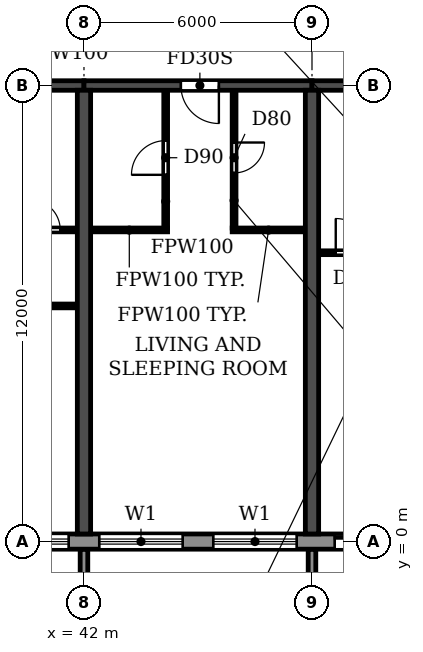
"""IFC4 building model, lengths in metres.
Left out: names, types, materials, properties, quantities, classifications, styles, units other than length and angle.
Written with IfcOpenShell. Run it as: python <this file> out.ifc"""

import sys

from ifc_helpers import new_model, si_unit, direction, frame, frame_2d, origin, place, context, subcontext, project, spatial, polyline, rectangle, outline, extrude, source, transform, mapped, element, fill, save


model = new_model("IFC4")
c1 = context("Model", 3, precision=1e-05, world=origin(), true_north=direction((0.0, 1.0)))
c2 = subcontext(c1, "Body", "Model", "MODEL_VIEW")
j1 = project(units=[si_unit("LENGTHUNIT", "METRE"), si_unit("PLANEANGLEUNIT", "RADIAN")], contexts=[c1])
p1 = place(None, origin())
s1 = spatial("IfcSite", under=j1, at=p1, CompositionType="ELEMENT")
p2 = place(p1, origin())
s2 = spatial("IfcBuilding", under=s1, at=p2, CompositionType="ELEMENT")
p3 = place(p2, frame((0.0, 0.0, 76.2)))
s3 = spatial("IfcBuildingStorey", under=s2, at=p3, CompositionType="ELEMENT", Elevation=76.2)
for number, where, z_axis, x_axis in (
    (1, (42.0, 0.2, 0.0), (0.0, 0.0, 1.0), (0.0, 1.0, 0.0)),
    (2, (48.0, 0.2, 0.0), (0.0, 0.0, 1.0), (0.0, 1.0, 0.0)),
):
    element("IfcWall", number, at=place(p3, frame(where, z_axis=z_axis, x_axis=x_axis)), inside=s3, PredefinedType="SHEAR", context=c2, shape_type="SweptSolid", body=[
        extrude(rectangle(XDim=11.675, YDim=0.35, at=frame_2d((5.837, 0.0))), origin(), (0.0, 0.0, 1.0), 3.06),
    ])
p4 = place(p3, frame((36.0, 12.0, 0.0), z_axis=(0.0, 0.0, 1.0), x_axis=(1.0, 0.0, 0.0)))
e3 = element("IfcWall", 3, at=p4, inside=s3, PredefinedType="SHEAR", context=c2, shape_type="SweptSolid", body=[
    extrude(rectangle(XDim=6.0, YDim=0.25, at=frame_2d((3.0, 0.0))), origin(), (0.0, 0.0, 1.0), 2.46),
])
p5 = place(p4, frame((2.55, 0.0, 0.0)))
e4 = element("IfcOpeningElement", 4, at=p5, cuts=e3, PredefinedType="OPENING", context=c2, shape_type="SweptSolid", body=[
    extrude(rectangle(XDim=1.0, YDim=2.1, at=frame_2d((0.5, 1.05))), frame((0.0, 0.135, 0.0), z_axis=(0.0, -1.0, 0.0), x_axis=(1.0, 0.0, 0.0)), (0.0, 0.0, 1.0), 0.27),
])
p6 = place(p3, frame((42.0, 12.0, 0.0), z_axis=(0.0, 0.0, 1.0), x_axis=(1.0, 0.0, 0.0)))
e5 = element("IfcWall", 5, at=p6, inside=s3, PredefinedType="SHEAR", context=c2, shape_type="SweptSolid", body=[
    extrude(rectangle(XDim=6.0, YDim=0.25, at=frame_2d((3.0, 0.0))), origin(), (0.0, 0.0, 1.0), 2.46),
])
p7 = place(p6, frame((2.55, 0.0, 0.0)))
e6 = element("IfcOpeningElement", 6, at=p7, cuts=e5, PredefinedType="OPENING", context=c2, shape_type="SweptSolid", body=[
    extrude(rectangle(XDim=1.0, YDim=2.1, at=frame_2d((0.5, 1.05))), frame((0.0, 0.135, 0.0), z_axis=(0.0, -1.0, 0.0), x_axis=(1.0, 0.0, 0.0)), (0.0, 0.0, 1.0), 0.27),
])
p8 = place(p3, frame((48.0, 12.0, 0.0), z_axis=(0.0, 0.0, 1.0), x_axis=(1.0, 0.0, 0.0)))
e7 = element("IfcWall", 7, at=p8, inside=s3, PredefinedType="SHEAR", context=c2, shape_type="SweptSolid", body=[
    extrude(rectangle(XDim=6.0, YDim=0.25, at=frame_2d((3.0, 0.0))), origin(), (0.0, 0.0, 1.0), 2.46),
])
p9 = place(p8, frame((2.55, 0.0, 0.0)))
e8 = element("IfcOpeningElement", 8, at=p9, cuts=e7, PredefinedType="OPENING", context=c2, shape_type="SweptSolid", body=[
    extrude(rectangle(XDim=1.0, YDim=2.1, at=frame_2d((0.5, 1.05))), frame((0.0, 0.135, 0.0), z_axis=(0.0, -1.0, 0.0), x_axis=(1.0, 0.0, 0.0)), (0.0, 0.0, 1.0), 0.27),
])
p10 = place(p3, frame((10.683, 0.0, 0.0), z_axis=(0.0, 0.0, 1.0), x_axis=(1.0, 0.0, 0.0)))
e9 = element("IfcWall", 9, at=p10, inside=s3, PredefinedType="STANDARD", context=c2, shape_type="SweptSolid", body=[
    extrude(rectangle(XDim=80.634, YDim=0.4, at=frame_2d((40.317, 0.0))), origin(), (0.0, 0.0, 1.0), 3.06),
])
p11 = place(p10, frame((1.717, 0.0, 0.9)))
e10 = element("IfcOpeningElement", 10, at=p11, cuts=e9, PredefinedType="OPENING", context=c2, shape_type="SweptSolid", body=[
    extrude(rectangle(XDim=2.2, YDim=1.5, at=frame_2d((1.1, 0.75))), frame((0.0, 0.21, 0.0), z_axis=(0.0, -1.0, 0.0), x_axis=(1.0, 0.0, 0.0)), (0.0, 0.0, 1.0), 0.42),
])
p12 = place(p10, frame((4.917, 0.0, 0.0)))
e11 = element("IfcOpeningElement", 11, at=p12, cuts=e9, PredefinedType="OPENING", context=c2, shape_type="SweptSolid", body=[
    extrude(rectangle(XDim=1.8, YDim=2.4, at=frame_2d((0.9, 1.2))), frame((0.0, 0.21, 0.0), z_axis=(0.0, -1.0, 0.0), x_axis=(1.0, 0.0, 0.0)), (0.0, 0.0, 1.0), 0.42),
])
p13 = place(p10, frame((7.717, 0.0, 0.9)))
e12 = element("IfcOpeningElement", 12, at=p13, cuts=e9, PredefinedType="OPENING", context=c2, shape_type="SweptSolid", body=[
    extrude(rectangle(XDim=2.2, YDim=1.5, at=frame_2d((1.1, 0.75))), frame((0.0, 0.21, 0.0), z_axis=(0.0, -1.0, 0.0), x_axis=(1.0, 0.0, 0.0)), (0.0, 0.0, 1.0), 0.42),
])
p14 = place(p10, frame((10.717, 0.0, 0.9)))
e13 = element("IfcOpeningElement", 13, at=p14, cuts=e9, PredefinedType="OPENING", context=c2, shape_type="SweptSolid", body=[
    extrude(rectangle(XDim=2.2, YDim=1.5, at=frame_2d((1.1, 0.75))), frame((0.0, 0.21, 0.0), z_axis=(0.0, -1.0, 0.0), x_axis=(1.0, 0.0, 0.0)), (0.0, 0.0, 1.0), 0.42),
])
p15 = place(p10, frame((13.717, 0.0, 0.9)))
e14 = element("IfcOpeningElement", 14, at=p15, cuts=e9, PredefinedType="OPENING", context=c2, shape_type="SweptSolid", body=[
    extrude(rectangle(XDim=2.2, YDim=1.5, at=frame_2d((1.1, 0.75))), frame((0.0, 0.21, 0.0), z_axis=(0.0, -1.0, 0.0), x_axis=(1.0, 0.0, 0.0)), (0.0, 0.0, 1.0), 0.42),
])
p16 = place(p10, frame((16.917, 0.0, 0.0)))
e15 = element("IfcOpeningElement", 15, at=p16, cuts=e9, PredefinedType="OPENING", context=c2, shape_type="SweptSolid", body=[
    extrude(rectangle(XDim=1.8, YDim=2.4, at=frame_2d((0.9, 1.2))), frame((0.0, 0.21, 0.0), z_axis=(0.0, -1.0, 0.0), x_axis=(1.0, 0.0, 0.0)), (0.0, 0.0, 1.0), 0.42),
])
p17 = place(p10, frame((19.717, 0.0, 0.9)))
e16 = element("IfcOpeningElement", 16, at=p17, cuts=e9, PredefinedType="OPENING", context=c2, shape_type="SweptSolid", body=[
    extrude(rectangle(XDim=2.2, YDim=1.5, at=frame_2d((1.1, 0.75))), frame((0.0, 0.21, 0.0), z_axis=(0.0, -1.0, 0.0), x_axis=(1.0, 0.0, 0.0)), (0.0, 0.0, 1.0), 0.42),
])
p18 = place(p10, frame((22.717, 0.0, 0.9)))
e17 = element("IfcOpeningElement", 17, at=p18, cuts=e9, PredefinedType="OPENING", context=c2, shape_type="SweptSolid", body=[
    extrude(rectangle(XDim=2.2, YDim=1.5, at=frame_2d((1.1, 0.75))), frame((0.0, 0.21, 0.0), z_axis=(0.0, -1.0, 0.0), x_axis=(1.0, 0.0, 0.0)), (0.0, 0.0, 1.0), 0.42),
])
p19 = place(p10, frame((25.917, 0.0, 0.0)))
e18 = element("IfcOpeningElement", 18, at=p19, cuts=e9, PredefinedType="OPENING", context=c2, shape_type="SweptSolid", body=[
    extrude(rectangle(XDim=1.8, YDim=2.4, at=frame_2d((0.9, 1.2))), frame((0.0, 0.21, 0.0), z_axis=(0.0, -1.0, 0.0), x_axis=(1.0, 0.0, 0.0)), (0.0, 0.0, 1.0), 0.42),
])
p20 = place(p10, frame((28.717, 0.0, 0.9)))
e19 = element("IfcOpeningElement", 19, at=p20, cuts=e9, PredefinedType="OPENING", context=c2, shape_type="SweptSolid", body=[
    extrude(rectangle(XDim=2.2, YDim=1.5, at=frame_2d((1.1, 0.75))), frame((0.0, 0.21, 0.0), z_axis=(0.0, -1.0, 0.0), x_axis=(1.0, 0.0, 0.0)), (0.0, 0.0, 1.0), 0.42),
])
p21 = place(p10, frame((31.717, 0.0, 0.9)))
e20 = element("IfcOpeningElement", 20, at=p21, cuts=e9, PredefinedType="OPENING", context=c2, shape_type="SweptSolid", body=[
    extrude(rectangle(XDim=2.2, YDim=1.5, at=frame_2d((1.1, 0.75))), frame((0.0, 0.21, 0.0), z_axis=(0.0, -1.0, 0.0), x_axis=(1.0, 0.0, 0.0)), (0.0, 0.0, 1.0), 0.42),
])
p22 = place(p10, frame((34.717, 0.0, 0.9)))
e21 = element("IfcOpeningElement", 21, at=p22, cuts=e9, PredefinedType="OPENING", context=c2, shape_type="SweptSolid", body=[
    extrude(rectangle(XDim=2.2, YDim=1.5, at=frame_2d((1.1, 0.75))), frame((0.0, 0.21, 0.0), z_axis=(0.0, -1.0, 0.0), x_axis=(1.0, 0.0, 0.0)), (0.0, 0.0, 1.0), 0.42),
])
p23 = place(p10, frame((37.917, 0.0, 0.0)))
e22 = element("IfcOpeningElement", 22, at=p23, cuts=e9, PredefinedType="OPENING", context=c2, shape_type="SweptSolid", body=[
    extrude(rectangle(XDim=1.8, YDim=2.4, at=frame_2d((0.9, 1.2))), frame((0.0, 0.21, 0.0), z_axis=(0.0, -1.0, 0.0), x_axis=(1.0, 0.0, 0.0)), (0.0, 0.0, 1.0), 0.42),
])
p24 = place(p10, frame((40.717, 0.0, 0.9)))
e23 = element("IfcOpeningElement", 23, at=p24, cuts=e9, PredefinedType="OPENING", context=c2, shape_type="SweptSolid", body=[
    extrude(rectangle(XDim=2.2, YDim=1.5, at=frame_2d((1.1, 0.75))), frame((0.0, 0.21, 0.0), z_axis=(0.0, -1.0, 0.0), x_axis=(1.0, 0.0, 0.0)), (0.0, 0.0, 1.0), 0.42),
])
p25 = place(p10, frame((43.717, 0.0, 0.9)))
e24 = element("IfcOpeningElement", 24, at=p25, cuts=e9, PredefinedType="OPENING", context=c2, shape_type="SweptSolid", body=[
    extrude(rectangle(XDim=2.2, YDim=1.5, at=frame_2d((1.1, 0.75))), frame((0.0, 0.21, 0.0), z_axis=(0.0, -1.0, 0.0), x_axis=(1.0, 0.0, 0.0)), (0.0, 0.0, 1.0), 0.42),
])
p26 = place(p10, frame((46.717, 0.0, 0.9)))
e25 = element("IfcOpeningElement", 25, at=p26, cuts=e9, PredefinedType="OPENING", context=c2, shape_type="SweptSolid", body=[
    extrude(rectangle(XDim=2.2, YDim=1.5, at=frame_2d((1.1, 0.75))), frame((0.0, 0.21, 0.0), z_axis=(0.0, -1.0, 0.0), x_axis=(1.0, 0.0, 0.0)), (0.0, 0.0, 1.0), 0.42),
])
p27 = place(p10, frame((49.917, 0.0, 0.0)))
e26 = element("IfcOpeningElement", 26, at=p27, cuts=e9, PredefinedType="OPENING", context=c2, shape_type="SweptSolid", body=[
    extrude(rectangle(XDim=1.8, YDim=2.4, at=frame_2d((0.9, 1.2))), frame((0.0, 0.21, 0.0), z_axis=(0.0, -1.0, 0.0), x_axis=(1.0, 0.0, 0.0)), (0.0, 0.0, 1.0), 0.42),
])
p28 = place(p10, frame((52.717, 0.0, 0.9)))
e27 = element("IfcOpeningElement", 27, at=p28, cuts=e9, PredefinedType="OPENING", context=c2, shape_type="SweptSolid", body=[
    extrude(rectangle(XDim=2.2, YDim=1.5, at=frame_2d((1.1, 0.75))), frame((0.0, 0.21, 0.0), z_axis=(0.0, -1.0, 0.0), x_axis=(1.0, 0.0, 0.0)), (0.0, 0.0, 1.0), 0.42),
])
p29 = place(p10, frame((55.717, 0.0, 0.9)))
e28 = element("IfcOpeningElement", 28, at=p29, cuts=e9, PredefinedType="OPENING", context=c2, shape_type="SweptSolid", body=[
    extrude(rectangle(XDim=2.2, YDim=1.5, at=frame_2d((1.1, 0.75))), frame((0.0, 0.21, 0.0), z_axis=(0.0, -1.0, 0.0), x_axis=(1.0, 0.0, 0.0)), (0.0, 0.0, 1.0), 0.42),
])
p30 = place(p10, frame((58.717, 0.0, 0.9)))
e29 = element("IfcOpeningElement", 29, at=p30, cuts=e9, PredefinedType="OPENING", context=c2, shape_type="SweptSolid", body=[
    extrude(rectangle(XDim=2.2, YDim=1.5, at=frame_2d((1.1, 0.75))), frame((0.0, 0.21, 0.0), z_axis=(0.0, -1.0, 0.0), x_axis=(1.0, 0.0, 0.0)), (0.0, 0.0, 1.0), 0.42),
])
p31 = place(p10, frame((61.717, 0.0, 0.9)))
e30 = element("IfcOpeningElement", 30, at=p31, cuts=e9, PredefinedType="OPENING", context=c2, shape_type="SweptSolid", body=[
    extrude(rectangle(XDim=2.2, YDim=1.5, at=frame_2d((1.1, 0.75))), frame((0.0, 0.21, 0.0), z_axis=(0.0, -1.0, 0.0), x_axis=(1.0, 0.0, 0.0)), (0.0, 0.0, 1.0), 0.42),
])
p32 = place(p10, frame((64.917, 0.0, 0.0)))
e31 = element("IfcOpeningElement", 31, at=p32, cuts=e9, PredefinedType="OPENING", context=c2, shape_type="SweptSolid", body=[
    extrude(rectangle(XDim=1.8, YDim=2.4, at=frame_2d((0.9, 1.2))), frame((0.0, 0.21, 0.0), z_axis=(0.0, -1.0, 0.0), x_axis=(1.0, 0.0, 0.0)), (0.0, 0.0, 1.0), 0.42),
])
p33 = place(p10, frame((67.717, 0.0, 0.9)))
e32 = element("IfcOpeningElement", 32, at=p33, cuts=e9, PredefinedType="OPENING", context=c2, shape_type="SweptSolid", body=[
    extrude(rectangle(XDim=2.2, YDim=1.5, at=frame_2d((1.1, 0.75))), frame((0.0, 0.21, 0.0), z_axis=(0.0, -1.0, 0.0), x_axis=(1.0, 0.0, 0.0)), (0.0, 0.0, 1.0), 0.42),
])
p34 = place(p10, frame((70.717, 0.0, 0.9)))
e33 = element("IfcOpeningElement", 33, at=p34, cuts=e9, PredefinedType="OPENING", context=c2, shape_type="SweptSolid", body=[
    extrude(rectangle(XDim=2.2, YDim=1.5, at=frame_2d((1.1, 0.75))), frame((0.0, 0.21, 0.0), z_axis=(0.0, -1.0, 0.0), x_axis=(1.0, 0.0, 0.0)), (0.0, 0.0, 1.0), 0.42),
])
p35 = place(p10, frame((73.917, 0.0, 0.0)))
e34 = element("IfcOpeningElement", 34, at=p35, cuts=e9, PredefinedType="OPENING", context=c2, shape_type="SweptSolid", body=[
    extrude(rectangle(XDim=1.8, YDim=2.4, at=frame_2d((0.9, 1.2))), frame((0.0, 0.21, 0.0), z_axis=(0.0, -1.0, 0.0), x_axis=(1.0, 0.0, 0.0)), (0.0, 0.0, 1.0), 0.42),
])
p36 = place(p10, frame((76.717, 0.0, 0.9)))
e35 = element("IfcOpeningElement", 35, at=p36, cuts=e9, PredefinedType="OPENING", context=c2, shape_type="SweptSolid", body=[
    extrude(rectangle(XDim=2.2, YDim=1.5, at=frame_2d((1.1, 0.75))), frame((0.0, 0.21, 0.0), z_axis=(0.0, -1.0, 0.0), x_axis=(1.0, 0.0, 0.0)), (0.0, 0.0, 1.0), 0.42),
])
m1 = source(origin(), c2, "Body", "SweptSolid", [
    extrude(outline(polyline([(0.0, 0.0), (0.2, 0.0), (0.2, 1.65), (0.0, 1.65), (0.0, 0.0)])), origin(), (0.0, 0.0, 1.0), 3.1),
])
for number, where in (
    (36, (41.9, -1.85, 0.0)),
    (37, (47.9, -1.85, 0.0)),
):
    element("IfcWall", number, at=place(p3, frame(where)), inside=s3, PredefinedType="STANDARD", context=c2, shape_type="MappedRepresentation", body=[
        mapped(m1, transform((0.0, 0.0, 0.0))),
    ])
p37 = place(p3, frame((38.95, 6.2, 0.0), z_axis=(0.0, 0.0, 1.0), x_axis=(1.0, 0.0, 0.0)))
e38 = element("IfcWall", 38, at=p37, inside=s3, PredefinedType="PARTITIONING", context=c2, shape_type="SweptSolid", body=[
    extrude(rectangle(XDim=2.865, YDim=0.1, at=frame_2d((1.433, 0.0))), origin(), (0.0, 0.0, 1.0), 3.06),
])
p38 = place(p37, frame((0.55, 0.0, 0.0)))
e39 = element("IfcOpeningElement", 39, at=p38, cuts=e38, PredefinedType="OPENING", context=c2, shape_type="SweptSolid", body=[
    extrude(rectangle(XDim=0.9, YDim=2.1, at=frame_2d((0.45, 1.05))), frame((0.0, 0.06, 0.0), z_axis=(0.0, -1.0, 0.0), x_axis=(1.0, 0.0, 0.0)), (0.0, 0.0, 1.0), 0.12),
])
p39 = place(p3, frame((48.185, 7.6, 0.0), z_axis=(0.0, 0.0, 1.0), x_axis=(1.0, 0.0, 0.0)))
e40 = element("IfcWall", 40, at=p39, inside=s3, PredefinedType="PARTITIONING", context=c2, shape_type="SweptSolid", body=[
    extrude(rectangle(XDim=2.015, YDim=0.1, at=frame_2d((1.007, 0.0))), origin(), (0.0, 0.0, 1.0), 3.06),
])
p40 = place(p39, frame((0.44, 0.0, 0.0)))
e41 = element("IfcOpeningElement", 41, at=p40, cuts=e40, PredefinedType="OPENING", context=c2, shape_type="SweptSolid", body=[
    extrude(rectangle(XDim=0.9, YDim=2.1, at=frame_2d((0.45, 1.05))), frame((0.0, 0.06, 0.0), z_axis=(0.0, -1.0, 0.0), x_axis=(1.0, 0.0, 0.0)), (0.0, 0.0, 1.0), 0.12),
])
p41 = place(p3, frame((39.9, 8.2, 0.0), z_axis=(0.0, 0.0, 1.0), x_axis=(1.0, 0.0, 0.0)))
e42 = element("IfcWall", 42, at=p41, inside=s3, PredefinedType="PARTITIONING", context=c2, shape_type="SweptSolid", body=[
    extrude(rectangle(XDim=1.915, YDim=0.1, at=frame_2d((0.958, 0.0))), origin(), (0.0, 0.0, 1.0), 3.06),
])
p42 = place(p41, frame((0.675, 0.0, 0.0)))
e43 = element("IfcOpeningElement", 43, at=p42, cuts=e42, PredefinedType="OPENING", context=c2, shape_type="SweptSolid", body=[
    extrude(rectangle(XDim=0.8, YDim=2.1, at=frame_2d((0.4, 1.05))), frame((0.0, 0.06, 0.0), z_axis=(0.0, -1.0, 0.0), x_axis=(1.0, 0.0, 0.0)), (0.0, 0.0, 1.0), 0.12),
])
p43 = place(p3, frame((42.185, 8.2, 0.0), z_axis=(0.0, 0.0, 1.0), x_axis=(1.0, 0.0, 0.0)))
e44 = element("IfcWall", 44, at=p43, inside=s3, PredefinedType="PARTITIONING", context=c2, shape_type="SweptSolid", body=[
    extrude(rectangle(XDim=2.015, YDim=0.1, at=frame_2d((1.007, 0.0))), origin(), (0.0, 0.0, 1.0), 3.06),
])
p44 = place(p3, frame((45.9, 8.2, 0.0), z_axis=(0.0, 0.0, 1.0), x_axis=(1.0, 0.0, 0.0)))
e45 = element("IfcWall", 45, at=p44, inside=s3, PredefinedType="PARTITIONING", context=c2, shape_type="SweptSolid", body=[
    extrude(rectangle(XDim=1.915, YDim=0.1, at=frame_2d((0.958, 0.0))), origin(), (0.0, 0.0, 1.0), 3.06),
])
p45 = place(p3, frame((44.15, 8.25, 0.0), z_axis=(0.0, 0.0, 1.0), x_axis=(0.0, 1.0, 0.0)))
e46 = element("IfcWall", 46, at=p45, inside=s3, PredefinedType="PARTITIONING", context=c2, shape_type="SweptSolid", body=[
    extrude(rectangle(XDim=3.615, YDim=0.1, at=frame_2d((1.808, 0.0))), origin(), (0.0, 0.0, 1.0), 3.06),
])
p46 = place(p45, frame((1.4, 0.0, 0.0)))
e47 = element("IfcOpeningElement", 47, at=p46, cuts=e46, PredefinedType="OPENING", context=c2, shape_type="SweptSolid", body=[
    extrude(rectangle(XDim=0.9, YDim=2.1, at=frame_2d((0.45, 1.05))), frame((0.0, 0.06, 0.0), z_axis=(0.0, -1.0, 0.0), x_axis=(1.0, 0.0, 0.0)), (0.0, 0.0, 1.0), 0.12),
])
p47 = place(p3, frame((45.95, 8.25, 0.0), z_axis=(0.0, 0.0, 1.0), x_axis=(0.0, 1.0, 0.0)))
e48 = element("IfcWall", 48, at=p47, inside=s3, PredefinedType="PARTITIONING", context=c2, shape_type="SweptSolid", body=[
    extrude(rectangle(XDim=3.615, YDim=0.1, at=frame_2d((1.808, 0.0))), origin(), (0.0, 0.0, 1.0), 3.06),
])
p48 = place(p47, frame((1.45, 0.0, 0.0)))
e49 = element("IfcOpeningElement", 49, at=p48, cuts=e48, PredefinedType="OPENING", context=c2, shape_type="SweptSolid", body=[
    extrude(rectangle(XDim=0.8, YDim=2.1, at=frame_2d((0.4, 1.05))), frame((0.0, 0.06, 0.0), z_axis=(0.0, -1.0, 0.0), x_axis=(1.0, 0.0, 0.0)), (0.0, 0.0, 1.0), 0.12),
])
p49 = place(p20, origin())
e50 = element("IfcWindow", 50, at=p49, inside=s3, PartitioningType="DOUBLE_PANEL_HORIZONTAL", PredefinedType="WINDOW", context=c2, shape_type="SweptSolid", body=[
    extrude(rectangle(XDim=2.2, YDim=1.5, at=frame_2d((1.1, 0.75))), frame((0.0, 0.03, 0.0), z_axis=(0.0, -1.0, 0.0), x_axis=(1.0, 0.0, 0.0)), (0.0, 0.0, 1.0), 0.06),
])
fill(e19, e50)
p50 = place(p21, origin())
e51 = element("IfcWindow", 51, at=p50, inside=s3, PartitioningType="DOUBLE_PANEL_HORIZONTAL", PredefinedType="WINDOW", context=c2, shape_type="SweptSolid", body=[
    extrude(rectangle(XDim=2.2, YDim=1.5, at=frame_2d((1.1, 0.75))), frame((0.0, 0.03, 0.0), z_axis=(0.0, -1.0, 0.0), x_axis=(1.0, 0.0, 0.0)), (0.0, 0.0, 1.0), 0.06),
])
fill(e20, e51)
p51 = place(p22, origin())
e52 = element("IfcWindow", 52, at=p51, inside=s3, PartitioningType="DOUBLE_PANEL_HORIZONTAL", PredefinedType="WINDOW", context=c2, shape_type="SweptSolid", body=[
    extrude(rectangle(XDim=2.2, YDim=1.5, at=frame_2d((1.1, 0.75))), frame((0.0, 0.03, 0.0), z_axis=(0.0, -1.0, 0.0), x_axis=(1.0, 0.0, 0.0)), (0.0, 0.0, 1.0), 0.06),
])
fill(e21, e52)
p52 = place(p23, origin())
e53 = element("IfcDoor", 53, at=p52, inside=s3, OperationType="DOUBLE_DOOR_SLIDING", PredefinedType="DOOR", context=c2, shape_type="SweptSolid", body=[
    extrude(rectangle(XDim=1.8, YDim=2.4, at=frame_2d((0.9, 1.2))), frame((0.0, 0.025, 0.0), z_axis=(0.0, -1.0, 0.0), x_axis=(1.0, 0.0, 0.0)), (0.0, 0.0, 1.0), 0.05),
])
fill(e22, e53)
p53 = place(p42, origin())
e54 = element("IfcDoor", 54, at=p53, inside=s3, OperationType="SINGLE_SWING_LEFT", PredefinedType="DOOR", context=c2, shape_type="SweptSolid", body=[
    extrude(rectangle(XDim=0.8, YDim=2.1, at=frame_2d((0.4, 1.05))), frame((0.0, 0.025, 0.0), z_axis=(0.0, -1.0, 0.0), x_axis=(1.0, 0.0, 0.0)), (0.0, 0.0, 1.0), 0.05),
])
fill(e43, e54)
p54 = place(p46, origin())
e55 = element("IfcDoor", 55, at=p54, inside=s3, OperationType="SINGLE_SWING_LEFT", PredefinedType="DOOR", context=c2, shape_type="SweptSolid", body=[
    extrude(rectangle(XDim=0.9, YDim=2.1, at=frame_2d((0.45, 1.05))), frame((0.0, 0.025, 0.0), z_axis=(0.0, -1.0, 0.0), x_axis=(1.0, 0.0, 0.0)), (0.0, 0.0, 1.0), 0.05),
])
fill(e47, e55)
p55 = place(p7, frame((1.0, 0.0, 0.0), z_axis=(0.0, 0.0, 1.0), x_axis=(-1.0, 0.0, 0.0)))
e56 = element("IfcDoor", 56, at=p55, inside=s3, OperationType="SINGLE_SWING_LEFT", PredefinedType="DOOR", context=c2, shape_type="SweptSolid", body=[
    extrude(rectangle(XDim=1.0, YDim=2.1, at=frame_2d((0.5, 1.05))), frame((0.0, 0.025, 0.0), z_axis=(0.0, -1.0, 0.0), x_axis=(1.0, 0.0, 0.0)), (0.0, 0.0, 1.0), 0.05),
])
fill(e6, e56)
p56 = place(p48, frame((0.8, 0.0, 0.0), z_axis=(0.0, 0.0, 1.0), x_axis=(-1.0, 0.0, 0.0)))
e57 = element("IfcDoor", 57, at=p56, inside=s3, OperationType="SINGLE_SWING_LEFT", PredefinedType="DOOR", context=c2, shape_type="SweptSolid", body=[
    extrude(rectangle(XDim=0.8, YDim=2.1, at=frame_2d((0.4, 1.05))), frame((0.0, 0.025, 0.0), z_axis=(0.0, -1.0, 0.0), x_axis=(1.0, 0.0, 0.0)), (0.0, 0.0, 1.0), 0.05),
])
fill(e49, e57)
p57 = place(p40, origin())
e58 = element("IfcDoor", 58, at=p57, inside=s3, OperationType="SINGLE_SWING_LEFT", PredefinedType="DOOR", context=c2, shape_type="SweptSolid", body=[
    extrude(rectangle(XDim=0.9, YDim=2.1, at=frame_2d((0.45, 1.05))), frame((0.0, 0.025, 0.0), z_axis=(0.0, -1.0, 0.0), x_axis=(1.0, 0.0, 0.0)), (0.0, 0.0, 1.0), 0.05),
])
fill(e41, e58)
save(model, sys.argv[1])
